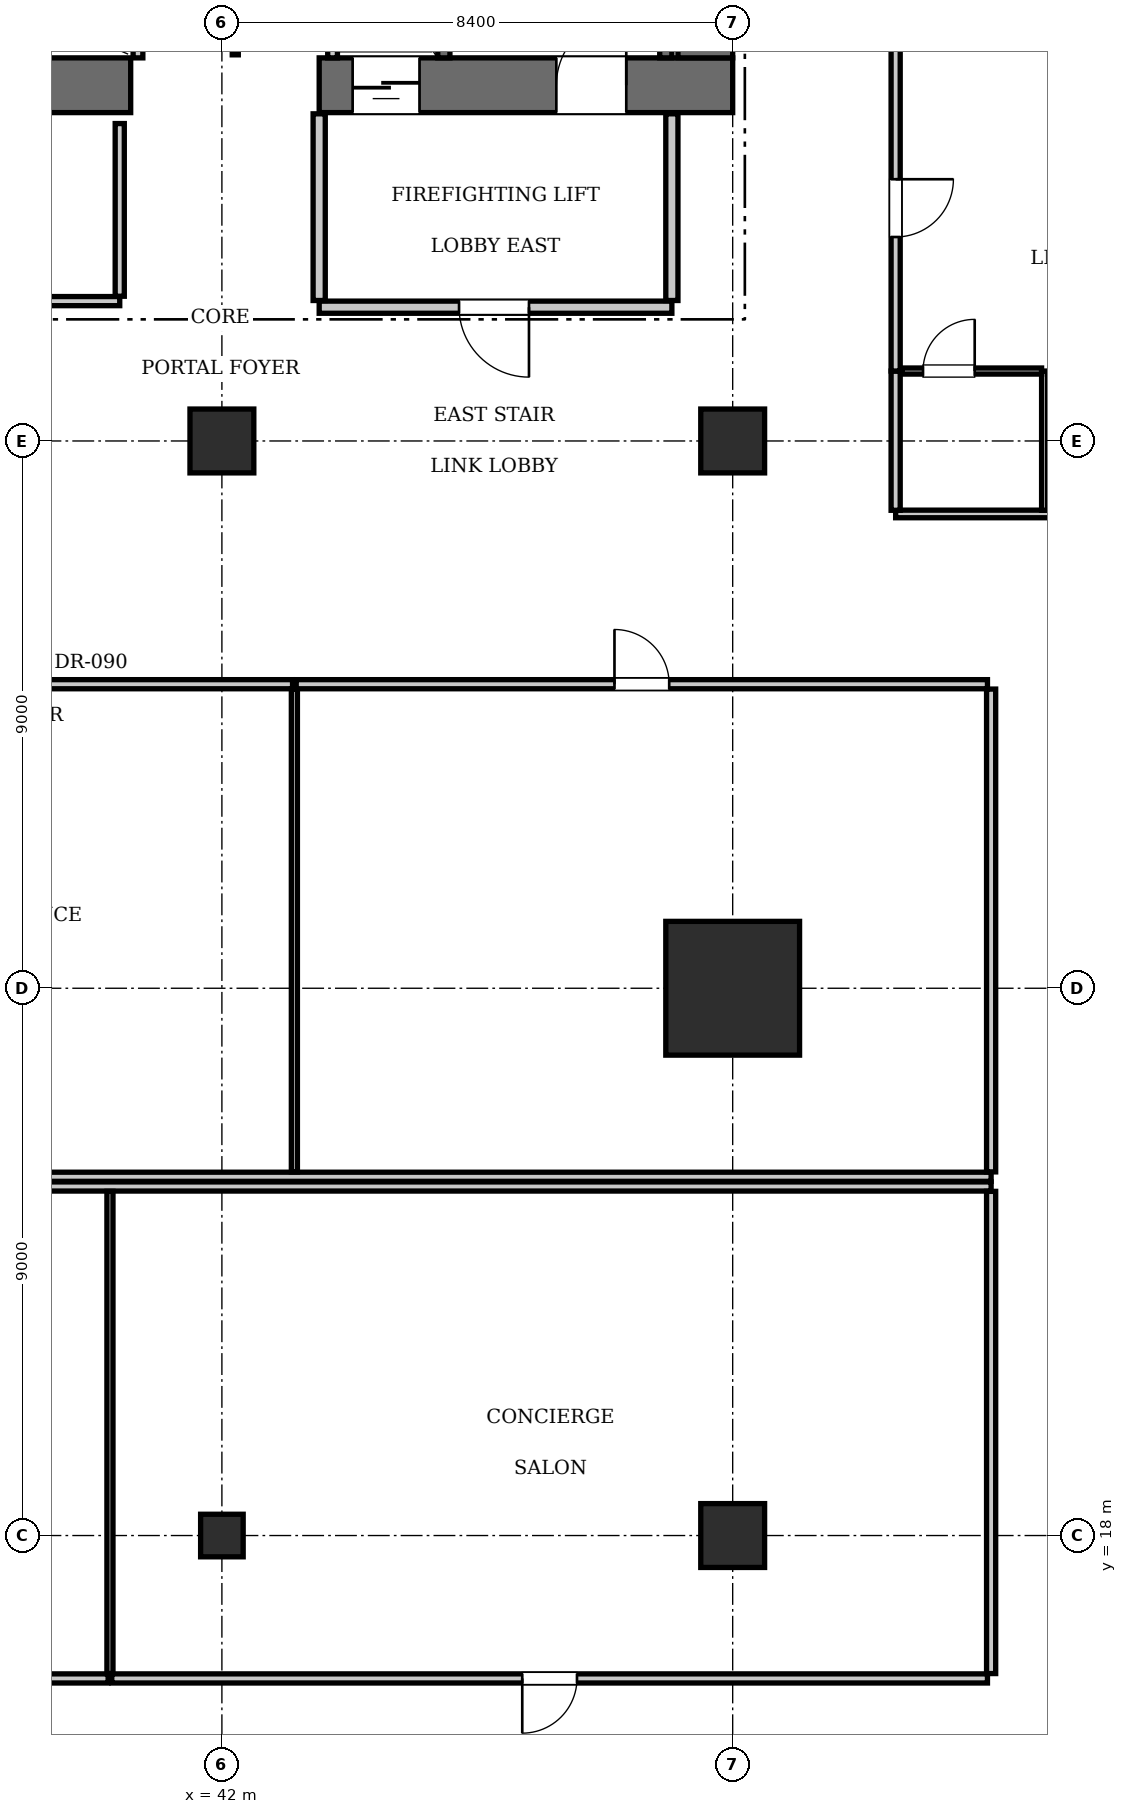
"""IFC4 building model, lengths in metres.
Left out: names, types, materials, properties, quantities, classifications, styles, units other than length and angle.
Written with IfcOpenShell. Run it as: python <this file> out.ifc"""

import sys

from ifc_helpers import new_model, si_unit, direction, frame, frame_2d, origin, origin_2d, place, context, subcontext, project, spatial, rectangle, i_section, extrude, element, fill, save


model = new_model("IFC4")
c1 = context("Model", 3, precision=1e-05, world=origin(), true_north=direction((0.0, 1.0)))
c2 = subcontext(c1, "Body", "Model", "MODEL_VIEW")
j1 = project(units=[si_unit("LENGTHUNIT", "METRE"), si_unit("PLANEANGLEUNIT", "RADIAN")], contexts=[c1])
p1 = place(None, origin())
s1 = spatial("IfcSite", under=j1, at=p1, CompositionType="ELEMENT")
p2 = place(p1, origin())
s2 = spatial("IfcBuilding", under=s1, at=p2, CompositionType="ELEMENT")
p3 = place(p2, frame((0.0, 0.0, 61.6)))
s3 = spatial("IfcBuildingStorey", under=s2, at=p3, CompositionType="ELEMENT", Elevation=61.6)
p4 = place(p3, frame((50.4, 27.0, 0.0), z_axis=(0.0, 0.0, 1.0), x_axis=(1.0, 0.0, 0.0)))
e1 = element("IfcColumn", 1, at=p4, inside=s3, PredefinedType="COLUMN", context=c2, shape_type="SweptSolid", body=[
    extrude(rectangle(XDim=2.2, YDim=2.2, at=origin_2d()), origin(), (0.0, 0.0, 1.0), 3.85),
])
p5 = place(p3, frame((35.1, 41.85, 0.0), z_axis=(0.0, 0.0, 1.0), x_axis=(1.0, 0.0, 0.0)))
e2 = element("IfcWall", 2, at=p5, inside=s3, PredefinedType="SHEAR", context=c2, shape_type="SweptSolid", body=[
    extrude(rectangle(XDim=5.4, YDim=0.9, at=frame_2d((2.7, 0.0))), origin(), (0.0, 0.0, 1.0), 3.85),
])
p6 = place(p3, frame((43.6, 41.85, 0.0), z_axis=(0.0, 0.0, 1.0), x_axis=(1.0, 0.0, 0.0)))
e3 = element("IfcWall", 3, at=p6, inside=s3, PredefinedType="SHEAR", context=c2, shape_type="SweptSolid", body=[
    extrude(rectangle(XDim=6.8, YDim=0.9, at=frame_2d((3.4, 0.0))), origin(), (0.0, 0.0, 1.0), 3.85),
])
p7 = place(p6, frame((3.9, 0.0, 0.0)))
e4 = element("IfcOpeningElement", 4, at=p7, cuts=e3, PredefinedType="OPENING", context=c2, shape_type="SweptSolid", body=[
    extrude(rectangle(XDim=1.15, YDim=2.15, at=frame_2d((0.575, 1.075))), frame((0.0, 0.46, 0.0), z_axis=(0.0, -1.0, 0.0), x_axis=(1.0, 0.0, 0.0)), (0.0, 0.0, 1.0), 0.92),
])
p8 = place(p6, frame((0.55, 0.0, 0.0)))
e5 = element("IfcOpeningElement", 5, at=p8, cuts=e3, PredefinedType="OPENING", context=c2, shape_type="SweptSolid", body=[
    extrude(rectangle(XDim=1.1, YDim=2.2, at=frame_2d((0.55, 1.1))), frame((0.0, 0.46, 0.0), z_axis=(0.0, -1.0, 0.0), x_axis=(1.0, 0.0, 0.0)), (0.0, 0.0, 1.0), 0.92),
])
p9 = place(p3, frame((49.95, 42.3, 0.0), z_axis=(0.0, 0.0, 1.0), x_axis=(0.0, 1.0, 0.0)))
e6 = element("IfcWall", 6, at=p9, inside=s3, PredefinedType="SHEAR", context=c2, shape_type="SweptSolid", body=[
    extrude(rectangle(XDim=1.6, YDim=0.9, at=frame_2d((0.8, 0.0))), origin(), (0.0, 0.0, 1.0), 3.85),
])
for number, where, z_axis, x_axis in (
    (7, (42.0, 36.0, 0.0), (0.0, 0.0, 1.0), (1.0, 0.0, 0.0)),
    (8, (50.4, 36.0, 0.0), (0.0, 0.0, 1.0), (1.0, 0.0, 0.0)),
    (9, (50.4, 18.0, 0.0), (0.0, 0.0, 1.0), (1.0, 0.0, 0.0)),
):
    element("IfcColumn", number, at=place(p3, frame(where, z_axis=z_axis, x_axis=x_axis)), inside=s3, PredefinedType="COLUMN", context=c2, shape_type="SweptSolid", body=[
        extrude(rectangle(XDim=1.05, YDim=1.05, at=origin_2d()), origin(), (0.0, 0.0, 1.0), 3.85),
    ])
p10 = place(p3, frame((42.0, 18.0, 0.0), z_axis=(0.0, 0.0, 1.0), x_axis=(1.0, 0.0, 0.0)))
e10 = element("IfcColumn", 10, at=p10, inside=s3, PredefinedType="COLUMN", context=c2, shape_type="SweptSolid", body=[
    extrude(i_section(OverallWidth=0.7, OverallDepth=0.7, WebThickness=0.028, FlangeThickness=0.044, at=origin_2d()), origin(), (0.0, 0.0, 1.0), 3.85),
])
p11 = place(p3, frame((45.65, 42.3, 0.0), z_axis=(0.0, 0.0, 1.0), x_axis=(0.0, 1.0, 0.0)))
e11 = element("IfcWall", 11, at=p11, inside=s3, PredefinedType="SOLIDWALL", context=c2, shape_type="SweptSolid", body=[
    extrude(rectangle(XDim=8.85, YDim=0.2, at=frame_2d((4.425, 0.0))), origin(), (0.0, 0.0, 1.0), 3.61),
])
p12 = place(p3, frame((49.3, 42.3, 0.0), z_axis=(0.0, 0.0, 1.0), x_axis=(0.0, 1.0, 0.0)))
e12 = element("IfcWall", 12, at=p12, inside=s3, PredefinedType="SOLIDWALL", context=c2, shape_type="SweptSolid", body=[
    extrude(rectangle(XDim=1.58, YDim=0.2, at=frame_2d((0.79, 0.0))), origin(), (0.0, 0.0, 1.0), 3.61),
])
p13 = place(p3, frame((43.82, 42.3, 0.0), z_axis=(0.0, 0.0, 1.0), x_axis=(0.0, 1.0, 0.0)))
e13 = element("IfcWall", 13, at=p13, inside=s3, PredefinedType="SOLIDWALL", context=c2, shape_type="SweptSolid", body=[
    extrude(rectangle(XDim=2.44, YDim=0.16, at=frame_2d((1.22, 0.0))), origin(), (0.0, 0.0, 1.0), 3.61),
])
p14 = place(p3, frame((40.62, 42.3, 0.0), z_axis=(0.0, 0.0, 1.0), x_axis=(0.0, 1.0, 0.0)))
e14 = element("IfcWall", 14, at=p14, inside=s3, PredefinedType="SOLIDWALL", context=c2, shape_type="SweptSolid", body=[
    extrude(rectangle(XDim=2.05, YDim=0.16, at=frame_2d((1.025, 0.0))), origin(), (0.0, 0.0, 1.0), 3.61),
])
p15 = place(p3, frame((43.6, 38.2, 0.0), z_axis=(0.0, 0.0, 1.0), x_axis=(1.0, 0.0, 0.0)))
e15 = element("IfcWall", 15, at=p15, inside=s3, PredefinedType="PARTITIONING", context=c2, shape_type="SweptSolid", body=[
    extrude(rectangle(XDim=5.8, YDim=0.2, at=frame_2d((2.9, 0.0))), origin(), (0.0, 0.0, 1.0), 3.61),
])
p16 = place(p15, frame((2.3, 0.0, 0.0)))
e16 = element("IfcOpeningElement", 16, at=p16, cuts=e15, PredefinedType="OPENING", context=c2, shape_type="SweptSolid", body=[
    extrude(rectangle(XDim=1.15, YDim=2.15, at=frame_2d((0.575, 1.075))), frame((0.0, 0.11, 0.0), z_axis=(0.0, -1.0, 0.0), x_axis=(1.0, 0.0, 0.0)), (0.0, 0.0, 1.0), 0.22),
])
for number, where, z_axis, x_axis in (
    (17, (43.6, 38.31, 0.0), (0.0, 0.0, 1.0), (0.0, 1.0, 0.0)),
    (18, (49.4, 38.31, 0.0), (0.0, 0.0, 1.0), (0.0, 1.0, 0.0)),
):
    element("IfcWall", number, at=place(p3, frame(where, z_axis=z_axis, x_axis=x_axis)), inside=s3, PredefinedType="PARTITIONING", context=c2, shape_type="SweptSolid", body=[
        extrude(rectangle(XDim=3.07, YDim=0.2, at=frame_2d((1.535, 0.0))), origin(), (0.0, 0.0, 1.0), 3.61),
    ])
p17 = place(p3, frame((42.22, 42.35, 0.0), z_axis=(0.0, 0.0, 1.0), x_axis=(0.0, 1.0, 0.0)))
e19 = element("IfcWall", 19, at=p17, inside=s3, PredefinedType="PARTITIONING", context=c2, shape_type="SweptSolid", body=[
    extrude(rectangle(XDim=2.61, YDim=0.1, at=frame_2d((1.305, 0.0))), origin(), (0.0, 0.0, 1.0), 3.61),
])
p18 = place(p17, frame((0.65, 0.0, 0.0)))
e20 = element("IfcOpeningElement", 20, at=p18, cuts=e19, PredefinedType="OPENING", context=c2, shape_type="SweptSolid", body=[
    extrude(rectangle(XDim=0.8, YDim=2.05, at=frame_2d((0.4, 1.025))), frame((0.0, 0.06, 0.0), z_axis=(0.0, -1.0, 0.0), x_axis=(1.0, 0.0, 0.0)), (0.0, 0.0, 1.0), 0.12),
])
p19 = place(p3, frame((37.38, 38.3, 0.0), z_axis=(0.0, 0.0, 1.0), x_axis=(1.0, 0.0, 0.0)))
e21 = element("IfcWall", 21, at=p19, inside=s3, PredefinedType="PARTITIONING", context=c2, shape_type="SweptSolid", body=[
    extrude(rectangle(XDim=2.94, YDim=0.15, at=frame_2d((1.47, 0.0))), origin(), (0.0, 0.0, 1.0), 3.61),
])
p20 = place(p19, frame((1.0, 0.0, 0.0)))
e22 = element("IfcOpeningElement", 22, at=p20, cuts=e21, PredefinedType="OPENING", context=c2, shape_type="SweptSolid", body=[
    extrude(rectangle(XDim=0.8, YDim=2.05, at=frame_2d((0.4, 1.025))), frame((0.0, 0.085, 0.0), z_axis=(0.0, -1.0, 0.0), x_axis=(1.0, 0.0, 0.0)), (0.0, 0.0, 1.0), 0.17),
])
p21 = place(p3, frame((40.32, 38.38, 0.0), z_axis=(0.0, 0.0, 1.0), x_axis=(0.0, 1.0, 0.0)))
e23 = element("IfcWall", 23, at=p21, inside=s3, PredefinedType="PARTITIONING", context=c2, shape_type="SweptSolid", body=[
    extrude(rectangle(XDim=2.84, YDim=0.15, at=frame_2d((1.42, 0.0))), origin(), (0.0, 0.0, 1.0), 3.61),
])
p22 = place(p3, frame((20.95, 23.9, 0.0), z_axis=(0.0, 0.0, 1.0), x_axis=(1.0, 0.0, 0.0)))
e24 = element("IfcWall", 24, at=p22, inside=s3, PredefinedType="PARTITIONING", context=c2, shape_type="SweptSolid", body=[
    extrude(rectangle(XDim=33.7, YDim=0.15, at=frame_2d((16.85, 0.0))), origin(), (0.0, 0.0, 1.0), 3.61),
])
p23 = place(p3, frame((54.65, 23.98, 0.0), z_axis=(0.0, 0.0, 1.0), x_axis=(0.0, 1.0, 0.0)))
e25 = element("IfcWall", 25, at=p23, inside=s3, PredefinedType="PARTITIONING", context=c2, shape_type="SweptSolid", body=[
    extrude(rectangle(XDim=7.94, YDim=0.15, at=frame_2d((3.97, 0.0))), origin(), (0.0, 0.0, 1.0), 3.293),
])
p24 = place(p3, frame((33.786, 32.0, 0.0), z_axis=(0.0, 0.0, 1.0), x_axis=(1.0, 0.0, 0.0)))
e26 = element("IfcWall", 26, at=p24, inside=s3, PredefinedType="PARTITIONING", context=c2, shape_type="SweptSolid", body=[
    extrude(rectangle(XDim=9.376, YDim=0.15, at=frame_2d((4.688, 0.0))), origin(), (0.0, 0.0, 1.0), 3.61),
])
p25 = place(p24, frame((4.238, 0.0, 0.0)))
e27 = element("IfcOpeningElement", 27, at=p25, cuts=e26, PredefinedType="OPENING", context=c2, shape_type="SweptSolid", body=[
    extrude(rectangle(XDim=0.9, YDim=2.1, at=frame_2d((0.45, 1.05))), frame((0.0, 0.085, 0.0), z_axis=(0.0, -1.0, 0.0), x_axis=(1.0, 0.0, 0.0)), (0.0, 0.0, 1.0), 0.17),
])
p26 = place(p3, frame((43.192, 23.98, 0.0), z_axis=(0.0, 0.0, 1.0), x_axis=(0.0, 1.0, 0.0)))
e28 = element("IfcWall", 28, at=p26, inside=s3, PredefinedType="PARTITIONING", context=c2, shape_type="SweptSolid", body=[
    extrude(rectangle(XDim=7.94, YDim=0.1, at=frame_2d((3.97, 0.0))), origin(), (0.0, 0.0, 1.0), 3.61),
])
p27 = place(p3, frame((43.222, 32.0, 0.0), z_axis=(0.0, 0.0, 1.0), x_axis=(1.0, 0.0, 0.0)))
e29 = element("IfcWall", 29, at=p27, inside=s3, PredefinedType="PARTITIONING", context=c2, shape_type="SweptSolid", body=[
    extrude(rectangle(XDim=11.368, YDim=0.15, at=frame_2d((5.684, 0.0))), origin(), (0.0, 0.0, 1.0), 3.61),
])
p28 = place(p27, frame((5.234, 0.0, 0.0)))
e30 = element("IfcOpeningElement", 30, at=p28, cuts=e29, PredefinedType="OPENING", context=c2, shape_type="SweptSolid", body=[
    extrude(rectangle(XDim=0.9, YDim=2.1, at=frame_2d((0.45, 1.05))), frame((0.0, 0.085, 0.0), z_axis=(0.0, -1.0, 0.0), x_axis=(1.0, 0.0, 0.0)), (0.0, 0.0, 1.0), 0.17),
])
p29 = place(p3, frame((20.95, 23.74, 0.0), z_axis=(0.0, 0.0, 1.0), x_axis=(1.0, 0.0, 0.0)))
e31 = element("IfcWall", 31, at=p29, inside=s3, PredefinedType="PARTITIONING", context=c2, shape_type="SweptSolid", body=[
    extrude(rectangle(XDim=33.7, YDim=0.15, at=frame_2d((16.85, 0.0))), origin(), (0.0, 0.0, 1.0), 3.61),
])
p30 = place(p3, frame((54.65, 15.73, 0.0), z_axis=(0.0, 0.0, 1.0), x_axis=(0.0, 1.0, 0.0)))
e32 = element("IfcWall", 32, at=p30, inside=s3, PredefinedType="PARTITIONING", context=c2, shape_type="SweptSolid", body=[
    extrude(rectangle(XDim=7.93, YDim=0.15, at=frame_2d((3.965, 0.0))), origin(), (0.0, 0.0, 1.0), 3.255),
])
p31 = place(p3, frame((28.731, 15.65, 0.0), z_axis=(0.0, 0.0, 1.0), x_axis=(1.0, 0.0, 0.0)))
e33 = element("IfcWall", 33, at=p31, inside=s3, PredefinedType="PARTITIONING", context=c2, shape_type="SweptSolid", body=[
    extrude(rectangle(XDim=11.398, YDim=0.15, at=frame_2d((5.699, 0.0))), origin(), (0.0, 0.0, 1.0), 3.61),
])
p32 = place(p31, frame((5.249, 0.0, 0.0)))
e34 = element("IfcOpeningElement", 34, at=p32, cuts=e33, PredefinedType="OPENING", context=c2, shape_type="SweptSolid", body=[
    extrude(rectangle(XDim=0.9, YDim=2.1, at=frame_2d((0.45, 1.05))), frame((0.0, 0.085, 0.0), z_axis=(0.0, -1.0, 0.0), x_axis=(1.0, 0.0, 0.0)), (0.0, 0.0, 1.0), 0.17),
])
p33 = place(p3, frame((40.159, 15.73, 0.0), z_axis=(0.0, 0.0, 1.0), x_axis=(0.0, 1.0, 0.0)))
e35 = element("IfcWall", 35, at=p33, inside=s3, PredefinedType="PARTITIONING", context=c2, shape_type="SweptSolid", body=[
    extrude(rectangle(XDim=7.93, YDim=0.1, at=frame_2d((3.965, 0.0))), origin(), (0.0, 0.0, 1.0), 3.61),
])
p34 = place(p3, frame((40.189, 15.65, 0.0), z_axis=(0.0, 0.0, 1.0), x_axis=(1.0, 0.0, 0.0)))
e36 = element("IfcWall", 36, at=p34, inside=s3, PredefinedType="PARTITIONING", context=c2, shape_type="SweptSolid", body=[
    extrude(rectangle(XDim=14.401, YDim=0.15, at=frame_2d((7.201, 0.0))), origin(), (0.0, 0.0, 1.0), 3.61),
])
p35 = place(p34, frame((6.75, 0.0, 0.0)))
e37 = element("IfcOpeningElement", 37, at=p35, cuts=e36, PredefinedType="OPENING", context=c2, shape_type="SweptSolid", body=[
    extrude(rectangle(XDim=0.9, YDim=2.1, at=frame_2d((0.45, 1.05))), frame((0.0, 0.085, 0.0), z_axis=(0.0, -1.0, 0.0), x_axis=(1.0, 0.0, 0.0)), (0.0, 0.0, 1.0), 0.17),
])
p36 = place(p3, frame((53.08, 34.8, 0.0), z_axis=(0.0, 0.0, 1.0), x_axis=(1.0, 0.0, 0.0)))
e38 = element("IfcWall", 38, at=p36, inside=s3, PredefinedType="PARTITIONING", context=c2, shape_type="SweptSolid", body=[
    extrude(rectangle(XDim=11.62, YDim=0.125, at=frame_2d((5.81, 0.0))), origin(), (0.0, 0.0, 1.0), 3.61),
])
p37 = place(p3, frame((53.08, 34.86, 0.0), z_axis=(0.0, 0.0, 1.0), x_axis=(0.0, 1.0, 0.0)))
e39 = element("IfcWall", 39, at=p37, inside=s3, PredefinedType="PARTITIONING", context=c2, shape_type="SweptSolid", body=[
    extrude(rectangle(XDim=2.29, YDim=0.15, at=frame_2d((1.145, 0.0))), origin(), (0.0, 0.0, 1.0), 3.61),
])
p38 = place(p3, frame((53.08, 37.15, 0.0), z_axis=(0.0, 0.0, 1.0), x_axis=(0.0, 1.0, 0.0)))
e40 = element("IfcWall", 40, at=p38, inside=s3, PredefinedType="PARTITIONING", context=c2, shape_type="SweptSolid", body=[
    extrude(rectangle(XDim=5.359, YDim=0.15, at=frame_2d((2.679, 0.0))), origin(), (0.0, 0.0, 1.0), 3.61),
])
p39 = place(p38, frame((2.204, 0.0, 0.0)))
e41 = element("IfcOpeningElement", 41, at=p39, cuts=e40, PredefinedType="OPENING", context=c2, shape_type="SweptSolid", body=[
    extrude(rectangle(XDim=0.95, YDim=2.15, at=frame_2d((0.475, 1.075))), frame((0.0, 0.085, 0.0), z_axis=(0.0, -1.0, 0.0), x_axis=(1.0, 0.0, 0.0)), (0.0, 0.0, 1.0), 0.17),
])
p40 = place(p3, frame((55.53, 34.86, 0.0), z_axis=(0.0, 0.0, 1.0), x_axis=(0.0, 1.0, 0.0)))
e42 = element("IfcWall", 42, at=p40, inside=s3, PredefinedType="PARTITIONING", context=c2, shape_type="SweptSolid", body=[
    extrude(rectangle(XDim=2.29, YDim=0.1, at=frame_2d((1.145, 0.0))), origin(), (0.0, 0.0, 1.0), 3.61),
])
p41 = place(p3, frame((53.18, 37.15, 0.0), z_axis=(0.0, 0.0, 1.0), x_axis=(1.0, 0.0, 0.0)))
e43 = element("IfcWall", 43, at=p41, inside=s3, PredefinedType="PARTITIONING", context=c2, shape_type="SweptSolid", body=[
    extrude(rectangle(XDim=2.3, YDim=0.1, at=frame_2d((1.15, 0.0))), origin(), (0.0, 0.0, 1.0), 3.61),
])
p42 = place(p41, frame((0.35, 0.0, 0.0)))
e44 = element("IfcOpeningElement", 44, at=p42, cuts=e43, PredefinedType="OPENING", context=c2, shape_type="SweptSolid", body=[
    extrude(rectangle(XDim=0.85, YDim=2.1, at=frame_2d((0.425, 1.05))), frame((0.0, 0.06, 0.0), z_axis=(0.0, -1.0, 0.0), x_axis=(1.0, 0.0, 0.0)), (0.0, 0.0, 1.0), 0.12),
])
p43 = place(p7, origin())
e45 = element("IfcDoor", 45, at=p43, inside=s3, OperationType="SINGLE_SWING_RIGHT", PredefinedType="DOOR", context=c2, shape_type="SweptSolid", body=[
    extrude(rectangle(XDim=1.15, YDim=2.15, at=frame_2d((0.575, 1.075))), frame((0.0, 0.025, 0.0), z_axis=(0.0, -1.0, 0.0), x_axis=(1.0, 0.0, 0.0)), (0.0, 0.0, 1.0), 0.05),
])
fill(e4, e45)
p44 = place(p8, frame((1.1, 0.0, 0.0), z_axis=(0.0, 0.0, 1.0), x_axis=(-1.0, 0.0, 0.0)))
e46 = element("IfcDoor", 46, at=p44, inside=s3, OperationType="SLIDING_TO_LEFT", PredefinedType="DOOR", context=c2, shape_type="SweptSolid", body=[
    extrude(rectangle(XDim=1.1, YDim=2.2, at=frame_2d((0.55, 1.1))), frame((0.0, 0.025, 0.0), z_axis=(0.0, -1.0, 0.0), x_axis=(1.0, 0.0, 0.0)), (0.0, 0.0, 1.0), 0.05),
])
fill(e5, e46)
p45 = place(p16, frame((1.15, 0.0, 0.0), z_axis=(0.0, 0.0, 1.0), x_axis=(-1.0, 0.0, 0.0)))
e47 = element("IfcDoor", 47, at=p45, inside=s3, OperationType="SINGLE_SWING_LEFT", PredefinedType="DOOR", context=c2, shape_type="SweptSolid", body=[
    extrude(rectangle(XDim=1.15, YDim=2.15, at=frame_2d((0.575, 1.075))), frame((0.0, 0.025, 0.0), z_axis=(0.0, -1.0, 0.0), x_axis=(1.0, 0.0, 0.0)), (0.0, 0.0, 1.0), 0.05),
])
fill(e16, e47)
p46 = place(p28, origin())
e48 = element("IfcDoor", 48, at=p46, inside=s3, OperationType="SINGLE_SWING_LEFT", PredefinedType="DOOR", context=c2, shape_type="SweptSolid", body=[
    extrude(rectangle(XDim=0.9, YDim=2.1, at=frame_2d((0.45, 1.05))), frame((0.0, 0.025, 0.0), z_axis=(0.0, -1.0, 0.0), x_axis=(1.0, 0.0, 0.0)), (0.0, 0.0, 1.0), 0.05),
])
fill(e30, e48)
p47 = place(p35, frame((0.9, 0.0, 0.0), z_axis=(0.0, 0.0, 1.0), x_axis=(-1.0, 0.0, 0.0)))
e49 = element("IfcDoor", 49, at=p47, inside=s3, OperationType="SINGLE_SWING_RIGHT", PredefinedType="DOOR", context=c2, shape_type="SweptSolid", body=[
    extrude(rectangle(XDim=0.9, YDim=2.1, at=frame_2d((0.45, 1.05))), frame((0.0, 0.025, 0.0), z_axis=(0.0, -1.0, 0.0), x_axis=(1.0, 0.0, 0.0)), (0.0, 0.0, 1.0), 0.05),
])
fill(e37, e49)
p48 = place(p42, origin())
e50 = element("IfcDoor", 50, at=p48, inside=s3, OperationType="SINGLE_SWING_RIGHT", PredefinedType="DOOR", context=c2, shape_type="SweptSolid", body=[
    extrude(rectangle(XDim=0.85, YDim=2.1, at=frame_2d((0.425, 1.05))), frame((0.0, 0.025, 0.0), z_axis=(0.0, -1.0, 0.0), x_axis=(1.0, 0.0, 0.0)), (0.0, 0.0, 1.0), 0.05),
])
fill(e44, e50)
p49 = place(p39, frame((0.95, 0.0, 0.0), z_axis=(0.0, 0.0, 1.0), x_axis=(-1.0, 0.0, 0.0)))
e51 = element("IfcDoor", 51, at=p49, inside=s3, OperationType="SINGLE_SWING_LEFT", PredefinedType="DOOR", context=c2, shape_type="SweptSolid", body=[
    extrude(rectangle(XDim=0.95, YDim=2.15, at=frame_2d((0.475, 1.075))), frame((0.0, 0.025, 0.0), z_axis=(0.0, -1.0, 0.0), x_axis=(1.0, 0.0, 0.0)), (0.0, 0.0, 1.0), 0.05),
])
fill(e41, e51)
save(model, sys.argv[1])
